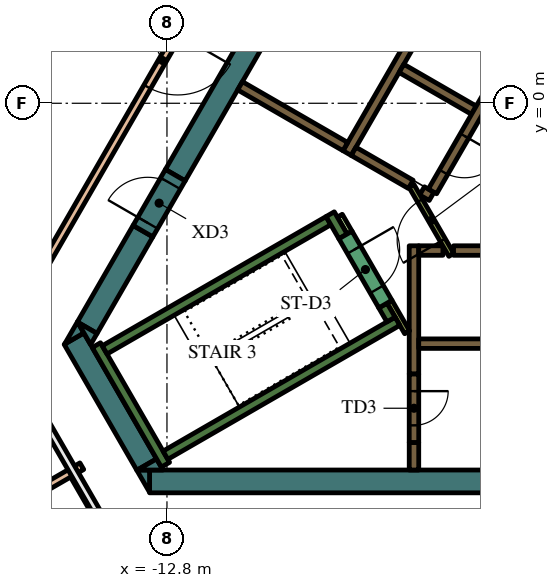
"""IFC4 building model, lengths in metres.
Left out: names, types, materials, properties, quantities, classifications, styles, units other than length and angle.
Written with IfcOpenShell. Run it as: python <this file> out.ifc"""

import sys

from ifc_helpers import new_model, si_unit, direction, frame, frame_2d, origin, place, context, subcontext, project, spatial, polyline, rectangle, outline, extrude, element, fill, save


model = new_model("IFC4")
c1 = context("Model", 3, precision=1e-05, world=origin(), true_north=direction((0.0, 1.0)))
c2 = subcontext(c1, "Body", "Model", "MODEL_VIEW")
j1 = project(units=[si_unit("LENGTHUNIT", "METRE"), si_unit("PLANEANGLEUNIT", "RADIAN")], contexts=[c1])
p1 = place(None, origin())
s1 = spatial("IfcSite", under=j1, at=p1, CompositionType="ELEMENT")
p2 = place(p1, origin())
s2 = spatial("IfcBuilding", under=s1, at=p2, CompositionType="ELEMENT")
p3 = place(p2, frame((0.0, 0.0, 340.2)))
s3 = spatial("IfcBuildingStorey", under=s2, at=p3, CompositionType="ELEMENT", Elevation=340.2)
p4 = place(p3, frame((8.904, -9.95, 0.0), z_axis=(0.0, 0.0, 1.0), x_axis=(-1.0, 0.0, 0.0)))
e1 = element("IfcWall", 1, at=p4, inside=s3, PredefinedType="SOLIDWALL", context=c2, shape_type="SweptSolid", body=[
    extrude(rectangle(XDim=22.161, YDim=0.6, at=frame_2d((11.081, 0.0))), origin(), (0.0, 0.0, 1.0), 4.2),
])
p5 = place(p3, origin())
e2 = element("IfcWall", 2, at=p5, inside=s3, PredefinedType="SOLIDWALL", context=c2, shape_type="SweptSolid", body=[
    extrude(outline(polyline([(-13.597, -9.65), (-13.259, -9.65), (-13.259, -10.236), (-13.597, -9.65)])), origin(), (0.0, 0.0, 1.0), 4.2),
])
p6 = place(p3, frame((-13.333, -9.506, 0.0), z_axis=(0.0, 0.0, 1.0), x_axis=(-0.500019073792, 0.866014391245, 0.0)))
e3 = element("IfcWall", 3, at=p6, inside=s3, PredefinedType="SOLIDWALL", context=c2, shape_type="SweptSolid", body=[
    extrude(rectangle(XDim=3.823, YDim=0.6, at=frame_2d((1.912, 0.0))), origin(), (0.0, 0.0, 1.0), 4.2),
])
e4 = element("IfcWall", 4, at=p5, inside=s3, PredefinedType="SOLIDWALL", context=c2, shape_type="SweptSolid", body=[
    extrude(outline(polyline([(-14.987, -6.043), (-15.493, -6.335), (-15.156, -5.75), (-14.987, -6.043)])), origin(), (0.0, 0.0, 1.0), 4.2),
])
e5 = element("IfcWall", 5, at=p5, inside=s3, PredefinedType="SOLIDWALL", context=c2, shape_type="SweptSolid", body=[
    extrude(outline(polyline([(-12.904, -9.65), (-13.58, -9.65), (-13.073, -9.357), (-12.904, -9.65)])), origin(), (0.0, 0.0, 1.0), 4.2),
])
p7 = place(p3, frame((-13.432, -3.364, 0.0), z_axis=(0.0, 0.0, 1.0), x_axis=(-0.499960127962, -0.866048422692, 0.0)))
e6 = element("IfcWall", 6, at=p7, inside=s3, PredefinedType="SOLIDWALL", context=c2, shape_type="SweptSolid", body=[
    extrude(rectangle(XDim=2.934, YDim=0.6, at=frame_2d((1.467, 0.0))), origin(), (0.0, 0.0, 1.0), 4.2),
])
e7 = element("IfcWall", 7, at=p5, inside=s3, PredefinedType="SOLIDWALL", context=c2, shape_type="SweptSolid", body=[
    extrude(outline(polyline([(-14.809, -6.35), (-15.147, -5.764), (-14.64, -6.057), (-14.809, -6.35)])), origin(), (0.0, 0.0, 1.0), 4.2),
])
p8 = place(p3, frame((-4.652, 11.842, 0.0), z_axis=(0.0, 0.0, 1.0), x_axis=(-0.500003640647, -0.866023301845, 0.0)))
e8 = element("IfcWall", 8, at=p8, inside=s3, PredefinedType="SOLIDWALL", context=c2, shape_type="SweptSolid", body=[
    extrude(rectangle(XDim=15.858, YDim=0.6, at=frame_2d((7.929, 0.0))), origin(), (0.0, 0.0, 1.0), 4.2),
])
p9 = place(p3, frame((-12.84, -9.511, 0.0), z_axis=(0.0, 0.0, 1.0), x_axis=(-0.499997733992, 0.866026712061, 0.0)))
e9 = element("IfcWall", 9, at=p9, inside=s3, PredefinedType="SOLIDWALL", context=c2, shape_type="SweptSolid", body=[
    extrude(rectangle(XDim=3.634, YDim=0.25, at=frame_2d((1.817, 0.0))), origin(), (0.0, 0.0, 1.0), 4.2),
])
p10 = place(p3, frame((-14.44, -6.49, 0.0), z_axis=(0.0, 0.0, 1.0), x_axis=(0.866022966069, 0.500004222222, 0.0)))
e10 = element("IfcWall", 10, at=p10, inside=s3, PredefinedType="SOLIDWALL", context=c2, shape_type="SweptSolid", body=[
    extrude(rectangle(XDim=6.8, YDim=0.25, at=frame_2d((3.4, 0.0))), origin(), (0.0, 0.0, 1.0), 4.2),
])
p11 = place(p3, frame((-8.168, -3.503, 0.0), z_axis=(0.0, 0.0, 1.0), x_axis=(-0.499952099219, 0.866053057547, 0.0)))
e11 = element("IfcWall", 11, at=p11, inside=s3, PredefinedType="SOLIDWALL", context=c2, shape_type="SweptSolid", body=[
    extrude(rectangle(XDim=0.675, YDim=0.25, at=frame_2d((0.337, 0.0))), origin(), (0.0, 0.0, 1.0), 4.2),
])
p12 = place(p3, frame((-12.84, -9.261, 0.0), z_axis=(0.0, 0.0, 1.0), x_axis=(0.866016039709, 0.500016218704, 0.0)))
e12 = element("IfcWall", 12, at=p12, inside=s3, PredefinedType="SOLIDWALL", context=c2, shape_type="SweptSolid", body=[
    extrude(rectangle(XDim=7.05, YDim=0.25, at=frame_2d((3.525, 0.0))), origin(), (0.0, 0.0, 1.0), 4.2),
])
p13 = place(p3, frame((-6.905, -5.69, 0.0), z_axis=(0.0, 0.0, 1.0), x_axis=(-0.500402024738, 0.865793170242, 0.0)))
e13 = element("IfcWall", 13, at=p13, inside=s3, PredefinedType="SOLIDWALL", context=c2, shape_type="SweptSolid", body=[
    extrude(rectangle(XDim=0.425, YDim=0.25, at=frame_2d((0.212, 0.0))), origin(), (0.0, 0.0, 1.0), 4.2),
])
p14 = place(p3, frame((-5.259, -3.875, 0.0), z_axis=(0.0, 0.0, 1.0), x_axis=(1.0, 0.0, 0.0)))
e14 = element("IfcWall", 14, at=p14, inside=s3, PredefinedType="SOLIDWALL", context=c2, shape_type="SweptSolid", body=[
    extrude(rectangle(XDim=10.489, YDim=0.25, at=frame_2d((5.244, 0.0))), origin(), (0.0, 0.0, 1.0), 4.2),
])
p15 = place(p3, frame((-6.3, -7.125, 0.0), z_axis=(0.0, 0.0, 1.0), x_axis=(0.0, 1.0, 0.0)))
e15 = element("IfcWall", 15, at=p15, inside=s3, PredefinedType="SOLIDWALL", context=c2, shape_type="SweptSolid", body=[
    extrude(rectangle(XDim=3.375, YDim=0.25, at=frame_2d((1.687, 0.0))), origin(), (0.0, 0.0, 1.0), 4.2),
])
p16 = place(p3, frame((-6.175, -3.875, 0.0), z_axis=(0.0, 0.0, 1.0), x_axis=(1.0, 0.0, 0.0)))
e16 = element("IfcWall", 16, at=p16, inside=s3, PredefinedType="SOLIDWALL", context=c2, shape_type="SweptSolid", body=[
    extrude(rectangle(XDim=0.637, YDim=0.25, at=frame_2d((0.318, 0.0))), origin(), (0.0, 0.0, 1.0), 4.2),
])
p17 = place(p3, frame((-6.3, -8.925, 0.0), z_axis=(0.0, 0.0, 1.0), x_axis=(0.0, -1.0, 0.0)))
e17 = element("IfcWall", 17, at=p17, inside=s3, PredefinedType="SOLIDWALL", context=c2, shape_type="SweptSolid", body=[
    extrude(rectangle(XDim=0.725, YDim=0.25, at=frame_2d((0.363, 0.0))), origin(), (0.0, 0.0, 1.0), 4.2),
])
p18 = place(p3, frame((-8.06, -1.311, 0.0), z_axis=(0.0, 0.0, 1.0), x_axis=(0.50000273126, 0.866023826885, 0.0)))
e18 = element("IfcWall", 18, at=p18, inside=s3, PredefinedType="SOLIDWALL", context=c2, shape_type="SweptSolid", body=[
    extrude(rectangle(XDim=10.33, YDim=0.25, at=frame_2d((5.165, 0.0))), origin(), (0.0, 0.0, 1.0), 4.2),
])
p19 = place(p3, frame((-4.724, -0.182, 0.0), z_axis=(0.0, 0.0, 1.0), x_axis=(-0.866008176907, 0.50002983664, 0.0)))
e19 = element("IfcWall", 19, at=p19, inside=s3, PredefinedType="SOLIDWALL", context=c2, shape_type="SweptSolid", body=[
    extrude(rectangle(XDim=2.2, YDim=0.25, at=frame_2d((1.1, 0.0))), origin(), (0.0, 0.0, 1.0), 4.2),
])
p20 = place(p3, frame((-6.088, -2.305, 0.0), z_axis=(0.0, 0.0, 1.0), x_axis=(0.866059450854, -0.499941024108, 0.0)))
e20 = element("IfcWall", 20, at=p20, inside=s3, PredefinedType="SOLIDWALL", context=c2, shape_type="SweptSolid", body=[
    extrude(rectangle(XDim=0.29, YDim=0.25, at=frame_2d((0.145, 0.0))), origin(), (0.0, 0.0, 1.0), 4.2),
])
p21 = place(p3, frame((-7.889, -1.265, 0.0), z_axis=(0.0, 0.0, 1.0), x_axis=(0.865986741702, -0.500066958712, 0.0)))
e21 = element("IfcWall", 21, at=p21, inside=s3, PredefinedType="SOLIDWALL", context=c2, shape_type="SweptSolid", body=[
    extrude(rectangle(XDim=1.738, YDim=0.25, at=frame_2d((0.869, 0.0))), origin(), (0.0, 0.0, 1.0), 4.2),
])
p22 = place(p3, frame((-8.106, -1.14, 0.0), z_axis=(0.0, 0.0, 1.0), x_axis=(-0.866008981251, 0.500028443584, 0.0)))
e22 = element("IfcWall", 22, at=p22, inside=s3, PredefinedType="SOLIDWALL", context=c2, shape_type="SweptSolid", body=[
    extrude(rectangle(XDim=3.2, YDim=0.25, at=frame_2d((1.6, 0.0))), origin(), (0.0, 0.0, 1.0), 4.2),
])
p23 = place(p3, frame((-8.252, -2.958, 0.0), z_axis=(0.0, 0.0, 1.0), x_axis=(0.500174715838, -0.865924508047, 0.0)))
e23 = element("IfcWall", 23, at=p23, inside=s3, PredefinedType="PARTITIONING", context=c2, shape_type="SweptSolid", body=[
    extrude(rectangle(XDim=0.514, YDim=0.15, at=frame_2d((0.257, 0.0))), origin(), (0.0, 0.0, 1.0), 3.45),
])
p24 = place(p3, frame((-6.48, -6.027, 0.0), z_axis=(0.0, 0.0, 1.0), x_axis=(-0.499927229454, 0.866067413802, 0.0)))
e24 = element("IfcWall", 24, at=p24, inside=s3, PredefinedType="PARTITIONING", context=c2, shape_type="SweptSolid", body=[
    extrude(rectangle(XDim=0.929, YDim=0.15, at=frame_2d((0.464, 0.0))), origin(), (0.0, 0.0, 1.0), 4.2),
])
p25 = place(p3, frame((-6.175, -6.325, 0.0), z_axis=(0.0, 0.0, 1.0), x_axis=(1.0, 0.0, 0.0)))
e25 = element("IfcWall", 25, at=p25, inside=s3, PredefinedType="SOLIDWALL", context=c2, shape_type="SweptSolid", body=[
    extrude(rectangle(XDim=12.35, YDim=0.25, at=frame_2d((6.175, 0.0))), origin(), (0.0, 0.0, 1.0), 4.2),
])
p26 = place(p25, frame((3.205, 0.0, 0.0)))
e26 = element("IfcOpeningElement", 26, at=p26, cuts=e25, PredefinedType="OPENING", context=c2, shape_type="SweptSolid", body=[
    extrude(rectangle(XDim=0.9, YDim=2.1, at=frame_2d((0.45, 1.05))), frame((0.0, 0.135, 0.0), z_axis=(0.0, -1.0, 0.0), x_axis=(1.0, 0.0, 0.0)), (0.0, 0.0, 1.0), 0.27),
])
p27 = place(p25, frame((8.145, 0.0, 0.0)))
e27 = element("IfcOpeningElement", 27, at=p27, cuts=e25, PredefinedType="OPENING", context=c2, shape_type="SweptSolid", body=[
    extrude(rectangle(XDim=1.1, YDim=2.1, at=frame_2d((0.55, 1.05))), frame((0.0, 0.135, 0.0), z_axis=(0.0, -1.0, 0.0), x_axis=(1.0, 0.0, 0.0)), (0.0, 0.0, 1.0), 0.27),
])
p28 = place(p25, frame((10.665, 0.0, 0.0)))
e28 = element("IfcOpeningElement", 28, at=p28, cuts=e25, PredefinedType="OPENING", context=c2, shape_type="SweptSolid", body=[
    extrude(rectangle(XDim=1.1, YDim=2.1, at=frame_2d((0.55, 1.05))), frame((0.0, 0.135, 0.0), z_axis=(0.0, -1.0, 0.0), x_axis=(1.0, 0.0, 0.0)), (0.0, 0.0, 1.0), 0.27),
])
p29 = place(p3, frame((-0.898, 6.194, 0.0), z_axis=(0.0, 0.0, 1.0), x_axis=(-0.499996202215, -0.866027596426, 0.0)))
e29 = element("IfcWall", 29, at=p29, inside=s3, PredefinedType="SOLIDWALL", context=c2, shape_type="SweptSolid", body=[
    extrude(rectangle(XDim=9.83, YDim=0.25, at=frame_2d((4.915, 0.0))), origin(), (0.0, 0.0, 1.0), 4.2),
])
p30 = place(p29, frame((0.585, 0.0, 0.0)))
e30 = element("IfcOpeningElement", 30, at=p30, cuts=e29, PredefinedType="OPENING", context=c2, shape_type="SweptSolid", body=[
    extrude(rectangle(XDim=1.1, YDim=2.1, at=frame_2d((0.55, 1.05))), frame((0.0, 0.135, 0.0), z_axis=(0.0, -1.0, 0.0), x_axis=(1.0, 0.0, 0.0)), (0.0, 0.0, 1.0), 0.27),
])
p31 = place(p29, frame((3.105, 0.0, 0.0)))
e31 = element("IfcOpeningElement", 31, at=p31, cuts=e29, PredefinedType="OPENING", context=c2, shape_type="SweptSolid", body=[
    extrude(rectangle(XDim=1.1, YDim=2.1, at=frame_2d((0.55, 1.05))), frame((0.0, 0.135, 0.0), z_axis=(0.0, -1.0, 0.0), x_axis=(1.0, 0.0, 0.0)), (0.0, 0.0, 1.0), 0.27),
])
p32 = place(p29, frame((5.625, 0.0, 0.0)))
e32 = element("IfcOpeningElement", 32, at=p32, cuts=e29, PredefinedType="OPENING", context=c2, shape_type="SweptSolid", body=[
    extrude(rectangle(XDim=1.1, YDim=2.1, at=frame_2d((0.55, 1.05))), frame((0.0, 0.135, 0.0), z_axis=(0.0, -1.0, 0.0), x_axis=(1.0, 0.0, 0.0)), (0.0, 0.0, 1.0), 0.27),
])
p33 = place(p29, frame((8.145, 0.0, 0.0)))
e33 = element("IfcOpeningElement", 33, at=p33, cuts=e29, PredefinedType="OPENING", context=c2, shape_type="SweptSolid", body=[
    extrude(rectangle(XDim=1.1, YDim=2.1, at=frame_2d((0.55, 1.05))), frame((0.0, 0.135, 0.0), z_axis=(0.0, -1.0, 0.0), x_axis=(1.0, 0.0, 0.0)), (0.0, 0.0, 1.0), 0.27),
])
p34 = place(p3, frame((-8.103, -3.466, 0.0), z_axis=(0.0, 0.0, 1.0), x_axis=(0.500078061341, -0.865980330357, 0.0)))
e34 = element("IfcWall", 34, at=p34, inside=s3, PredefinedType="SOLIDWALL", context=c2, shape_type="SweptSolid", body=[
    extrude(rectangle(XDim=2.1, YDim=0.4, at=frame_2d((1.05, 0.0))), origin(), (0.0, 0.0, 1.0), 4.2),
])
p35 = place(p34, frame((0.45, 0.0, 0.0)))
e35 = element("IfcOpeningElement", 35, at=p35, cuts=e34, PredefinedType="OPENING", context=c2, shape_type="SweptSolid", body=[
    extrude(rectangle(XDim=1.2, YDim=2.1, at=frame_2d((0.6, 1.05))), frame((0.0, 0.21, 0.0), z_axis=(0.0, -1.0, 0.0), x_axis=(1.0, 0.0, 0.0)), (0.0, 0.0, 1.0), 0.42),
])
p36 = place(p3, frame((-6.3, -7.125, 0.0), z_axis=(0.0, 0.0, 1.0), x_axis=(0.0, -1.0, 0.0)))
e36 = element("IfcWall", 36, at=p36, inside=s3, PredefinedType="SOLIDWALL", context=c2, shape_type="SweptSolid", body=[
    extrude(rectangle(XDim=1.8, YDim=0.25, at=frame_2d((0.9, 0.0))), origin(), (0.0, 0.0, 1.0), 4.2),
])
p37 = place(p36, frame((0.45, 0.0, 0.0)))
e37 = element("IfcOpeningElement", 37, at=p37, cuts=e36, PredefinedType="OPENING", context=c2, shape_type="SweptSolid", body=[
    extrude(rectangle(XDim=0.9, YDim=2.1, at=frame_2d((0.45, 1.05))), frame((0.0, 0.135, 0.0), z_axis=(0.0, -1.0, 0.0), x_axis=(1.0, 0.0, 0.0)), (0.0, 0.0, 1.0), 0.27),
])
p38 = place(p3, frame((-5.317, -3.99, 0.0), z_axis=(0.0, 0.0, 1.0), x_axis=(-0.500027713859, 0.866009402589, 0.0)))
e38 = element("IfcWall", 38, at=p38, inside=s3, PredefinedType="PARTITIONING", context=c2, shape_type="SweptSolid", body=[
    extrude(rectangle(XDim=2.1, YDim=0.15, at=frame_2d((1.05, 0.0))), origin(), (0.0, 0.0, 1.0), 4.2),
])
p39 = place(p38, frame((0.45, 0.0, 0.0)))
e39 = element("IfcOpeningElement", 39, at=p39, cuts=e38, PredefinedType="OPENING", context=c2, shape_type="SweptSolid", body=[
    extrude(rectangle(XDim=1.2, YDim=2.1, at=frame_2d((0.6, 1.05))), frame((0.0, 0.085, 0.0), z_axis=(0.0, -1.0, 0.0), x_axis=(1.0, 0.0, 0.0)), (0.0, 0.0, 1.0), 0.17),
])
p40 = place(p3, frame((-13.432, -3.364, 0.0), z_axis=(0.0, 0.0, 1.0), x_axis=(0.500000056704, 0.866025371046, 0.0)))
e40 = element("IfcWall", 40, at=p40, inside=s3, PredefinedType="SOLIDWALL", context=c2, shape_type="SweptSolid", body=[
    extrude(rectangle(XDim=1.7, YDim=0.6, at=frame_2d((0.85, 0.0))), origin(), (0.0, 0.0, 1.0), 4.2),
])
p41 = place(p40, frame((0.25, 0.0, 0.0)))
e41 = element("IfcOpeningElement", 41, at=p41, cuts=e40, PredefinedType="OPENING", context=c2, shape_type="SweptSolid", body=[
    extrude(rectangle(XDim=1.2, YDim=2.1, at=frame_2d((0.6, 1.05))), frame((0.0, 0.31, 0.0), z_axis=(0.0, -1.0, 0.0), x_axis=(1.0, 0.0, 0.0)), (0.0, 0.0, 1.0), 0.62),
])
p42 = place(p3, frame((-8.602, 8.602, 0.0), z_axis=(0.0, 0.0, 1.0), x_axis=(-0.499992973356, -0.866029460581, 0.0)))
e42 = element("IfcWall", 42, at=p42, inside=s3, PredefinedType="PARTITIONING", context=c2, shape_type="SweptSolid", body=[
    extrude(rectangle(XDim=17.265, YDim=0.2, at=frame_2d((8.632, 0.0))), origin(), (0.0, 0.0, 1.0), 3.45),
])
p43 = place(p42, frame((7.833, 0.0, 0.0)))
e43 = element("IfcOpeningElement", 43, at=p43, cuts=e42, PredefinedType="OPENING", context=c2, shape_type="SweptSolid", body=[
    extrude(rectangle(XDim=1.6, YDim=2.1, at=frame_2d((0.8, 1.05))), frame((0.0, 0.11, 0.0), z_axis=(0.0, -1.0, 0.0), x_axis=(1.0, 0.0, 0.0)), (0.0, 0.0, 1.0), 0.22),
])
p44 = place(p3, frame((-15.04, -9.55, 0.0), z_axis=(0.0, 0.0, 1.0), x_axis=(-0.866034723298, -0.499983857782, 0.0)))
e44 = element("IfcWall", 44, at=p44, inside=s3, PredefinedType="PARTITIONING", context=c2, shape_type="SweptSolid", body=[
    extrude(rectangle(XDim=3.989, YDim=0.2, at=frame_2d((1.994, 0.0))), origin(), (0.0, 0.0, 1.0), 3.45),
])
p45 = place(p3, frame((-14.161, -11.672, 0.0), z_axis=(0.0, 0.0, 1.0), x_axis=(-0.499997407846, 0.86602690036, 0.0)))
e45 = element("IfcWall", 45, at=p45, inside=s3, PredefinedType="PARTITIONING", context=c2, shape_type="SweptSolid", body=[
    extrude(rectangle(XDim=2.178, YDim=0.2, at=frame_2d((1.089, 0.0))), origin(), (0.0, 0.0, 1.0), 3.45),
])
p46 = place(p3, frame((-7.54, 16.64, 0.0), z_axis=(0.0, 0.0, 1.0), x_axis=(-0.500002158106, -0.866024157798, 0.0)))
e46 = element("IfcWall", 46, at=p46, inside=s3, PredefinedType="SOLIDWALL", context=c2, shape_type="SweptSolid", body=[
    extrude(rectangle(XDim=21.282, YDim=0.3, at=frame_2d((10.641, 0.0))), origin(), (0.0, 0.0, 1.0), 3.45),
])
p47 = place(p33, origin())
e47 = element("IfcDoor", 47, at=p47, inside=s3, OperationType="DOUBLE_DOOR_SLIDING", PredefinedType="DOOR", context=c2, shape_type="SweptSolid", body=[
    extrude(rectangle(XDim=1.1, YDim=2.1, at=frame_2d((0.55, 1.05))), frame((0.0, 0.025, 0.0), z_axis=(0.0, -1.0, 0.0), x_axis=(1.0, 0.0, 0.0)), (0.0, 0.0, 1.0), 0.05),
])
fill(e33, e47)
p48 = place(p35, origin())
e48 = element("IfcDoor", 48, at=p48, inside=s3, OperationType="SINGLE_SWING_LEFT", PredefinedType="DOOR", context=c2, shape_type="SweptSolid", body=[
    extrude(rectangle(XDim=1.2, YDim=2.1, at=frame_2d((0.6, 1.05))), frame((0.0, 0.025, 0.0), z_axis=(0.0, -1.0, 0.0), x_axis=(1.0, 0.0, 0.0)), (0.0, 0.0, 1.0), 0.05),
])
fill(e35, e48)
p49 = place(p37, origin())
e49 = element("IfcDoor", 49, at=p49, inside=s3, OperationType="SINGLE_SWING_LEFT", PredefinedType="DOOR", context=c2, shape_type="SweptSolid", body=[
    extrude(rectangle(XDim=0.9, YDim=2.1, at=frame_2d((0.45, 1.05))), frame((0.0, 0.025, 0.0), z_axis=(0.0, -1.0, 0.0), x_axis=(1.0, 0.0, 0.0)), (0.0, 0.0, 1.0), 0.05),
])
fill(e37, e49)
p50 = place(p39, origin())
e50 = element("IfcDoor", 50, at=p50, inside=s3, OperationType="SINGLE_SWING_LEFT", PredefinedType="DOOR", context=c2, shape_type="SweptSolid", body=[
    extrude(rectangle(XDim=1.2, YDim=2.1, at=frame_2d((0.6, 1.05))), frame((0.0, 0.025, 0.0), z_axis=(0.0, -1.0, 0.0), x_axis=(1.0, 0.0, 0.0)), (0.0, 0.0, 1.0), 0.05),
])
fill(e39, e50)
p51 = place(p41, origin())
e51 = element("IfcDoor", 51, at=p51, inside=s3, OperationType="SINGLE_SWING_LEFT", PredefinedType="DOOR", context=c2, shape_type="SweptSolid", body=[
    extrude(rectangle(XDim=1.2, YDim=2.1, at=frame_2d((0.6, 1.05))), frame((0.0, 0.025, 0.0), z_axis=(0.0, -1.0, 0.0), x_axis=(1.0, 0.0, 0.0)), (0.0, 0.0, 1.0), 0.05),
])
fill(e41, e51)
p52 = place(p43, origin())
e52 = element("IfcDoor", 52, at=p52, inside=s3, OperationType="DOUBLE_DOOR_SINGLE_SWING", PredefinedType="DOOR", context=c2, shape_type="SweptSolid", body=[
    extrude(rectangle(XDim=1.6, YDim=2.1, at=frame_2d((0.8, 1.05))), frame((0.0, 0.025, 0.0), z_axis=(0.0, -1.0, 0.0), x_axis=(1.0, 0.0, 0.0)), (0.0, 0.0, 1.0), 0.05),
])
fill(e43, e52)
save(model, sys.argv[1])
